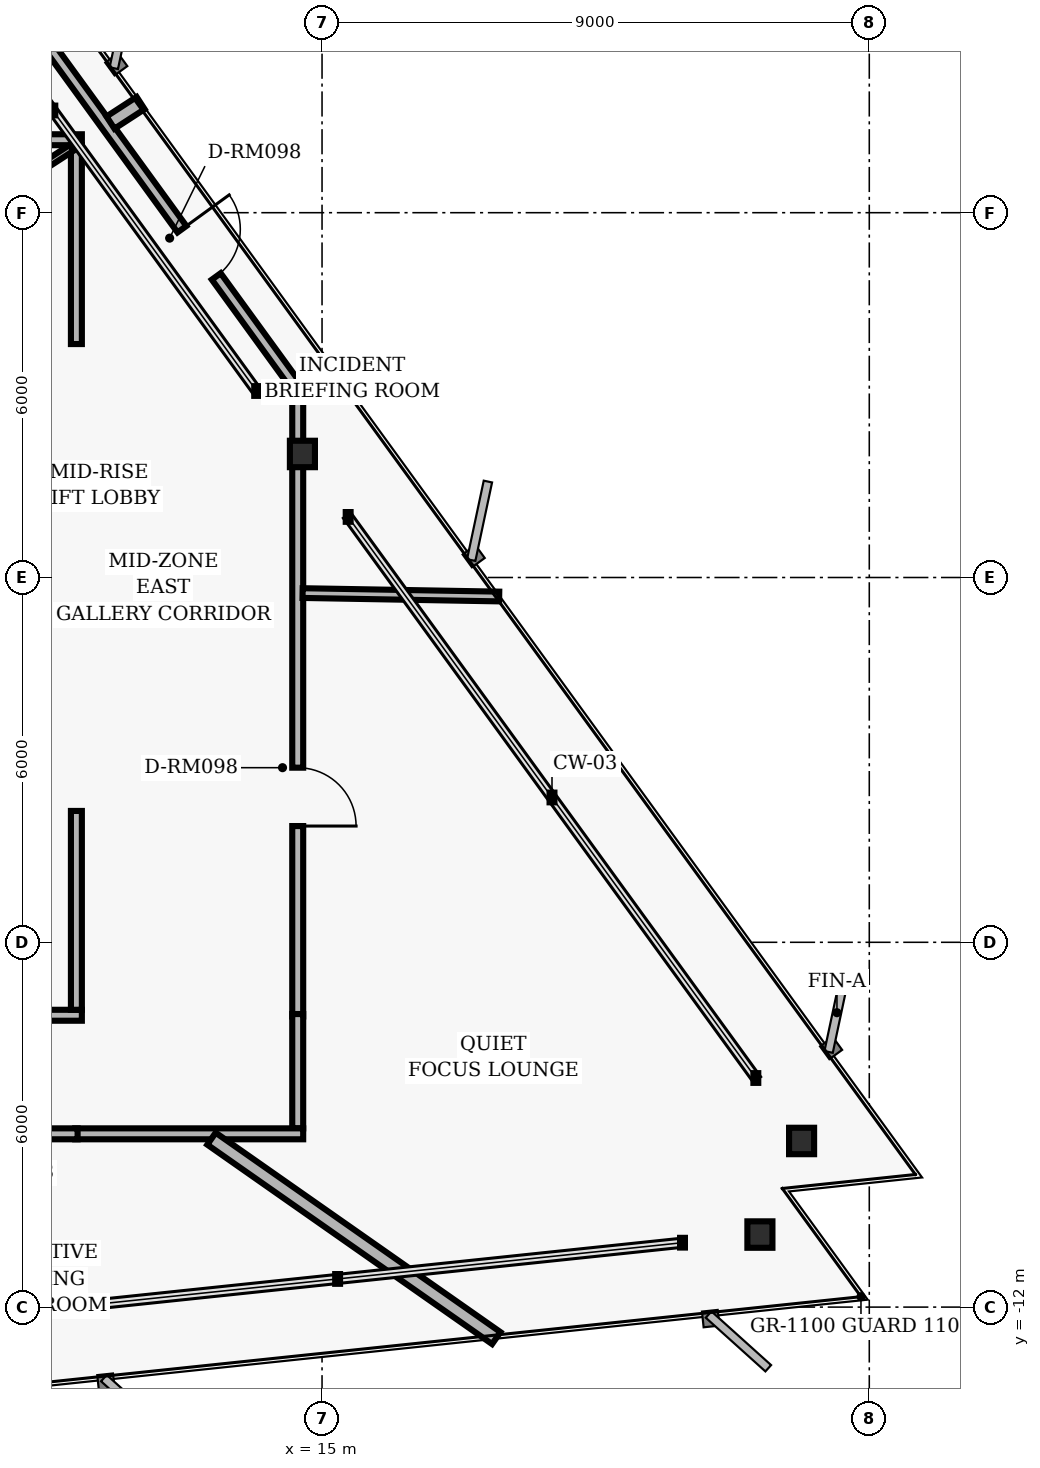
"""IFC4 building model, lengths in metres.
Left out: names, types, materials, properties, quantities, classifications, styles, units other than length and angle.
Written with IfcOpenShell. Run it as: python <this file> out.ifc"""

import sys

from ifc_helpers import new_model, si_unit, direction, frame, frame_2d, origin, origin_2d, place, context, subcontext, project, spatial, rectangle, i_section, extrude, element, fill, save


model = new_model("IFC4")
c1 = context("Model", 3, precision=1e-05, world=origin(), true_north=direction((0.0, 1.0)))
c2 = subcontext(c1, "Body", "Model", "MODEL_VIEW")
j1 = project(units=[si_unit("LENGTHUNIT", "METRE"), si_unit("PLANEANGLEUNIT", "RADIAN")], contexts=[c1])
p1 = place(None, origin())
s1 = spatial("IfcSite", under=j1, at=p1, CompositionType="ELEMENT")
p2 = place(p1, origin())
s2 = spatial("IfcBuilding", under=s1, at=p2, CompositionType="ELEMENT")
p3 = place(p2, frame((0.0, 0.0, 113.76)))
s3 = spatial("IfcBuildingStorey", under=s2, at=p3, CompositionType="ELEMENT", Elevation=113.76)
for number, where, z_axis, x_axis in (
    (1, (22.887, -9.268, 0.0), (0.0, 0.0, 1.0), (1.0, 0.0, 0.0)),
    (2, (14.677, 2.032, 0.0), (0.0, 0.0, 1.0), (1.0, 0.0, 0.0)),
    (3, (22.201, -10.807, 0.0), (0.0, 0.0, 1.0), (1.0, 0.0, 0.0)),
):
    element("IfcColumn", number, at=place(p3, frame(where, z_axis=z_axis, x_axis=x_axis)), inside=s3, PredefinedType="COLUMN", context=c2, shape_type="SweptSolid", body=[
        extrude(i_section(OverallWidth=0.412, OverallDepth=0.435, WebThickness=0.036, FlangeThickness=0.057, FilletRadius=0.022, at=origin_2d()), origin(), (0.0, 0.0, 1.0), 3.04),
    ])
p4 = place(p3, frame((10.263, 9.077, 0.0), z_axis=(0.0, 0.0, 1.0), x_axis=(0.587780951295, -0.809020119215, 0.0)))
e4 = element("IfcWall", 4, at=p4, inside=s3, PredefinedType="PARTITIONING", context=c2, shape_type="SweptSolid", body=[
    extrude(rectangle(XDim=7.469, YDim=0.18, at=frame_2d((3.734, 0.0))), origin(), (0.0, 0.0, 1.0), 2.763),
])
p5 = place(p4, frame((4.139, 0.0, 0.0)))
e5 = element("IfcOpeningElement", 5, at=p5, cuts=e4, PredefinedType="OPENING", context=c2, shape_type="SweptSolid", body=[
    extrude(rectangle(XDim=0.96, YDim=2.02, at=frame_2d((0.48, 1.01))), frame((0.0, 0.1, 0.0), z_axis=(0.0, -1.0, 0.0), x_axis=(1.0, 0.0, 0.0)), (0.0, 0.0, 1.0), 0.2),
])
p6 = place(p3, frame((14.6, 3.018, 0.0), z_axis=(0.0, 0.0, 1.0), x_axis=(0.0, -1.0, 0.0)))
e6 = element("IfcWall", 6, at=p6, inside=s3, PredefinedType="PARTITIONING", context=c2, shape_type="SweptSolid", body=[
    extrude(rectangle(XDim=10.238, YDim=0.18, at=frame_2d((5.119, 0.0))), origin(), (0.0, 0.0, 1.0), 2.763),
])
p7 = place(p6, frame((6.146, 0.0, 0.0)))
e7 = element("IfcOpeningElement", 7, at=p7, cuts=e6, PredefinedType="OPENING", context=c2, shape_type="SweptSolid", body=[
    extrude(rectangle(XDim=0.96, YDim=2.02, at=frame_2d((0.48, 1.01))), frame((0.0, 0.1, 0.0), z_axis=(0.0, -1.0, 0.0), x_axis=(1.0, 0.0, 0.0)), (0.0, 0.0, 1.0), 0.2),
])
p8 = place(p3, frame((14.6, -7.18, 0.0), z_axis=(0.0, 0.0, 1.0), x_axis=(0.0, -1.0, 0.0)))
e8 = element("IfcWall", 8, at=p8, inside=s3, PredefinedType="PARTITIONING", context=c2, shape_type="SweptSolid", body=[
    extrude(rectangle(XDim=1.88, YDim=0.18, at=frame_2d((0.94, 0.0))), origin(), (0.0, 0.0, 1.0), 2.763),
])
p9 = place(p3, frame((14.69, -9.15, 0.0), z_axis=(0.0, 0.0, 1.0), x_axis=(-1.0, 0.0, 0.0)))
e9 = element("IfcWall", 9, at=p9, inside=s3, PredefinedType="PARTITIONING", context=c2, shape_type="SweptSolid", body=[
    extrude(rectangle(XDim=3.75, YDim=0.18, at=frame_2d((1.875, 0.0))), origin(), (0.0, 0.0, 1.0), 2.33),
])
p10 = place(p3, frame((10.98, -9.15, 0.0), z_axis=(0.0, 0.0, 1.0), x_axis=(-1.0, 0.0, 0.0)))
e10 = element("IfcWall", 10, at=p10, inside=s3, PredefinedType="PARTITIONING", context=c2, shape_type="SweptSolid", body=[
    extrude(rectangle(XDim=17.5, YDim=0.18, at=frame_2d((8.75, 0.0))), origin(), (0.0, 0.0, 1.0), 2.33),
])
p11 = place(p10, frame((14.696, 0.0, 0.0)))
e11 = element("IfcOpeningElement", 11, at=p11, cuts=e10, PredefinedType="OPENING", context=c2, shape_type="SweptSolid", body=[
    extrude(rectangle(XDim=0.96, YDim=2.02, at=frame_2d((0.48, 1.01))), frame((0.0, 0.1, 0.0), z_axis=(0.0, -1.0, 0.0), x_axis=(1.0, 0.0, 0.0)), (0.0, 0.0, 1.0), 0.2),
])
p12 = place(p10, frame((9.764, 0.0, 0.0)))
e12 = element("IfcOpeningElement", 12, at=p12, cuts=e10, PredefinedType="OPENING", context=c2, shape_type="SweptSolid", body=[
    extrude(rectangle(XDim=1.02, YDim=2.02, at=frame_2d((0.51, 1.01))), frame((0.0, 0.1, 0.0), z_axis=(0.0, -1.0, 0.0), x_axis=(1.0, 0.0, 0.0)), (0.0, 0.0, 1.0), 0.2),
])
p13 = place(p10, frame((3.366, 0.0, 0.0)))
e13 = element("IfcOpeningElement", 13, at=p13, cuts=e10, PredefinedType="OPENING", context=c2, shape_type="SweptSolid", body=[
    extrude(rectangle(XDim=0.96, YDim=2.02, at=frame_2d((0.48, 1.01))), frame((0.0, 0.1, 0.0), z_axis=(0.0, -1.0, 0.0), x_axis=(1.0, 0.0, 0.0)), (0.0, 0.0, 1.0), 0.2),
])
p14 = place(p3, frame((5.53, -7.2, 0.0), z_axis=(0.0, 0.0, 1.0), x_axis=(1.0, 0.0, 0.0)))
e14 = element("IfcWall", 14, at=p14, inside=s3, PredefinedType="PARTITIONING", context=c2, shape_type="SweptSolid", body=[
    extrude(rectangle(XDim=5.52, YDim=0.18, at=frame_2d((2.76, 0.0))), origin(), (0.0, 0.0, 1.0), 2.33),
])
p15 = place(p14, frame((1.94, 0.0, 0.0)))
e15 = element("IfcOpeningElement", 15, at=p15, cuts=e14, PredefinedType="OPENING", context=c2, shape_type="SweptSolid", body=[
    extrude(rectangle(XDim=0.96, YDim=2.02, at=frame_2d((0.48, 1.01))), frame((0.0, 0.1, 0.0), z_axis=(0.0, -1.0, 0.0), x_axis=(1.0, 0.0, 0.0)), (0.0, 0.0, 1.0), 0.2),
])
for number, where, z_axis, x_axis in (
    (16, (10.96, -7.11, 0.0), (0.0, 0.0, 1.0), (0.0, 1.0, 0.0)),
    (17, (10.96, 3.84, 0.0), (0.0, 0.0, 1.0), (0.0, 1.0, 0.0)),
):
    element("IfcWall", number, at=place(p3, frame(where, z_axis=z_axis, x_axis=x_axis)), inside=s3, PredefinedType="PARTITIONING", context=c2, shape_type="SweptSolid", body=[
        extrude(rectangle(XDim=3.271, YDim=0.18, at=frame_2d((1.635, 0.0))), origin(), (0.0, 0.0, 1.0), 2.763),
    ])
p16 = place(p3, frame((11.05, 7.2, 0.0), z_axis=(0.0, 0.0, 1.0), x_axis=(-1.0, 0.0, 0.0)))
e18 = element("IfcWall", 18, at=p16, inside=s3, PredefinedType="PARTITIONING", context=c2, shape_type="SweptSolid", body=[
    extrude(rectangle(XDim=5.12, YDim=0.18, at=frame_2d((2.56, 0.0))), origin(), (0.0, 0.0, 1.0), 2.763),
])
p17 = place(p16, frame((1.97, 0.0, 0.0)))
e19 = element("IfcOpeningElement", 19, at=p17, cuts=e18, PredefinedType="OPENING", context=c2, shape_type="SweptSolid", body=[
    extrude(rectangle(XDim=1.18, YDim=2.02, at=frame_2d((0.59, 1.01))), frame((0.0, 0.1, 0.0), z_axis=(0.0, -1.0, 0.0), x_axis=(1.0, 0.0, 0.0)), (0.0, 0.0, 1.0), 0.2),
])
p18 = place(p3, frame((13.182, -9.23, 0.0), z_axis=(0.0, 0.0, 1.0), x_axis=(0.819133610169, -0.573602762102, 0.0)))
e20 = element("IfcWall", 20, at=p18, inside=s3, PredefinedType="PARTITIONING", context=c2, shape_type="SweptSolid", body=[
    extrude(rectangle(XDim=5.718, YDim=0.24, at=frame_2d((2.859, 0.0))), origin(), (0.0, 0.0, 1.0), 2.763),
])
p19 = place(p3, frame((14.68, -0.256, 0.0), z_axis=(0.0, 0.0, 1.0), x_axis=(0.999846583078, -0.017516001455, 0.0)))
e21 = element("IfcWall", 21, at=p19, inside=s3, PredefinedType="PARTITIONING", context=c2, shape_type="SweptSolid", body=[
    extrude(rectangle(XDim=3.234, YDim=0.16, at=frame_2d((1.617, 0.0))), origin(), (0.0, 0.0, 1.0), 2.763),
])
p20 = place(p3, frame((7.561, 4.91, 0.0), z_axis=(0.0, 0.0, 1.0), x_axis=(0.838633829817, 0.544695602595, 0.0)))
e22 = element("IfcWall", 22, at=p20, inside=s3, PredefinedType="MOVABLE", context=c2, shape_type="SweptSolid", body=[
    extrude(rectangle(XDim=3.958, YDim=0.115, at=frame_2d((1.979, 0.0))), origin(), (0.0, 0.0, 1.0), 2.763),
])
p21 = place(p3, frame((11.521, 7.482, 0.0), z_axis=(0.0, 0.0, 1.0), x_axis=(0.838415292805, 0.545031922726, 0.0)))
e23 = element("IfcWall", 23, at=p21, inside=s3, PredefinedType="PARTITIONING", context=c2, shape_type="SweptSolid", body=[
    extrude(rectangle(XDim=0.591, YDim=0.24, at=frame_2d((0.295, 0.0))), origin(), (0.0, 0.0, 1.0), 2.763),
])
p22 = place(p7, origin())
e24 = element("IfcDoor", 24, at=p22, inside=s3, OperationType="SINGLE_SWING_RIGHT", PredefinedType="DOOR", context=c2, shape_type="SweptSolid", body=[
    extrude(rectangle(XDim=0.96, YDim=2.02, at=frame_2d((0.48, 1.01))), frame((0.0, 0.025, 0.0), z_axis=(0.0, -1.0, 0.0), x_axis=(1.0, 0.0, 0.0)), (0.0, 0.0, 1.0), 0.05),
])
fill(e7, e24)
p23 = place(p5, origin())
e25 = element("IfcDoor", 25, at=p23, inside=s3, OperationType="SINGLE_SWING_LEFT", PredefinedType="DOOR", context=c2, shape_type="SweptSolid", body=[
    extrude(rectangle(XDim=0.96, YDim=2.02, at=frame_2d((0.48, 1.01))), frame((0.0, 0.025, 0.0), z_axis=(0.0, -1.0, 0.0), x_axis=(1.0, 0.0, 0.0)), (0.0, 0.0, 1.0), 0.05),
])
fill(e5, e25)
save(model, sys.argv[1])
